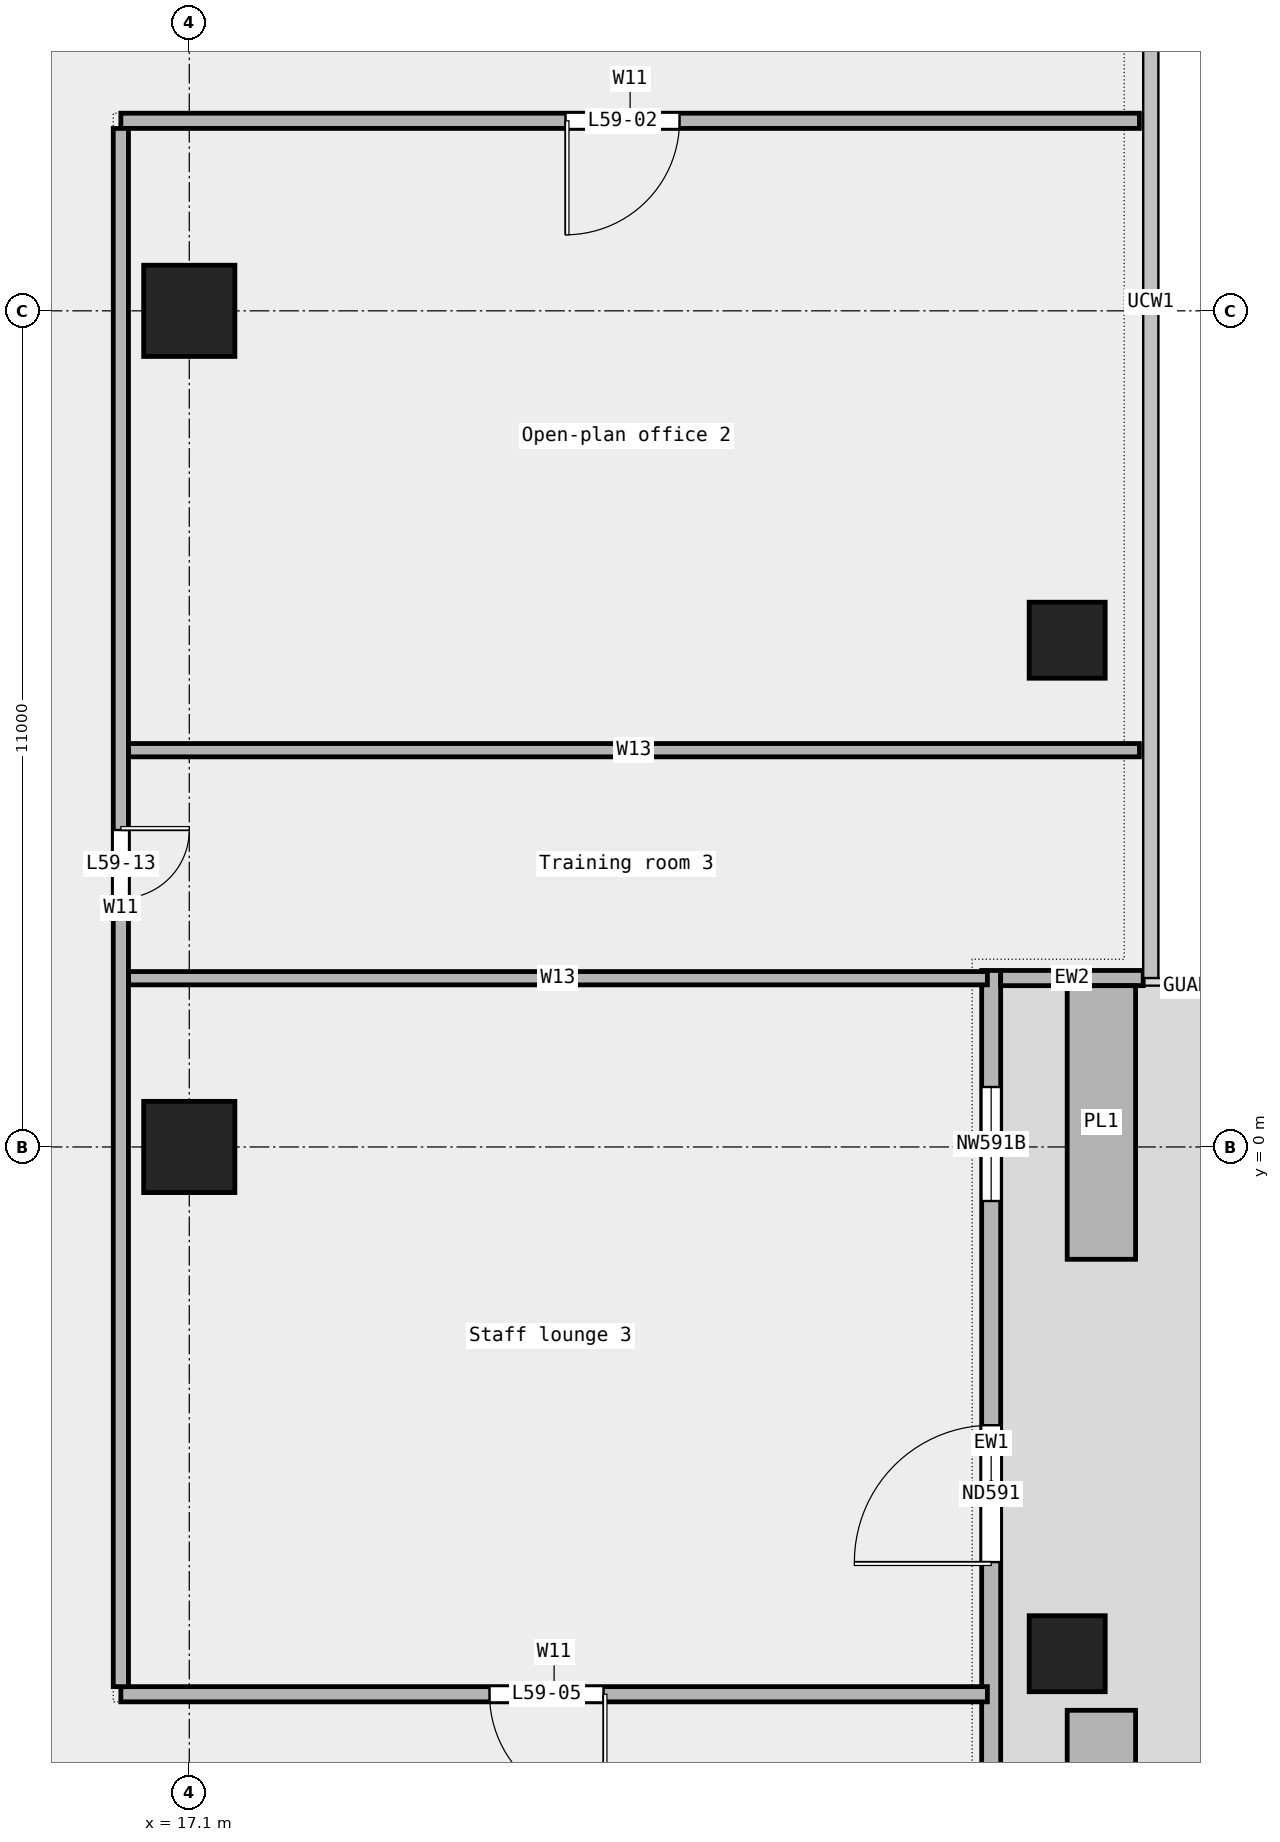
"""IFC4 building model, lengths in metres.
Left out: names, types, materials, properties, quantities, classifications, styles, units other than length and angle.
Written with IfcOpenShell. Run it as: python <this file> out.ifc"""

import sys

from ifc_helpers import new_model, si_unit, direction, frame, frame_2d, origin, origin_2d, place, context, subcontext, project, spatial, rectangle, extrude, element, fill, save


model = new_model("IFC4")
c1 = context("Model", 3, precision=1e-05, world=origin(), true_north=direction((0.0, 1.0)))
c2 = subcontext(c1, "Body", "Model", "MODEL_VIEW")
j1 = project(units=[si_unit("LENGTHUNIT", "METRE"), si_unit("PLANEANGLEUNIT", "RADIAN")], contexts=[c1])
p1 = place(None, origin())
s1 = spatial("IfcSite", under=j1, at=p1, CompositionType="ELEMENT")
p2 = place(p1, origin())
s2 = spatial("IfcBuilding", under=s1, at=p2, CompositionType="ELEMENT")
p3 = place(p2, frame((0.0, 0.0, 275.4)))
s3 = spatial("IfcBuildingStorey", under=s2, at=p3, CompositionType="ELEMENT", Elevation=275.4)
for number, where, z_axis, x_axis in (
    (1, (28.65, -6.667, 0.0), (0.0, 0.0, 1.0), (1.0, 0.0, 0.0)),
    (2, (28.65, 6.667, 0.0), (0.0, 0.0, 1.0), (1.0, 0.0, 0.0)),
):
    element("IfcColumn", number, at=place(p3, frame(where, z_axis=z_axis, x_axis=x_axis)), inside=s3, PredefinedType="COLUMN", context=c2, shape_type="SweptSolid", body=[
        extrude(rectangle(XDim=1.0, YDim=1.0, at=origin_2d()), origin(), (0.0, 0.0, 1.0), 3.6),
    ])
for number, where, z_axis, x_axis in (
    (3, (17.1, 0.0, 0.0), (0.0, 0.0, 1.0), (1.0, 0.0, 0.0)),
    (4, (17.1, 11.0, 0.0), (0.0, 0.0, 1.0), (1.0, 0.0, 0.0)),
):
    element("IfcColumn", number, at=place(p3, frame(where, z_axis=z_axis, x_axis=x_axis)), inside=s3, PredefinedType="COLUMN", context=c2, shape_type="SweptSolid", body=[
        extrude(rectangle(XDim=1.2, YDim=1.2, at=origin_2d()), origin(), (0.0, 0.0, 1.0), 3.6),
    ])
p4 = place(p3, frame((27.65, -11.211, 0.0), z_axis=(0.0, 0.0, 1.0), x_axis=(0.0, 1.0, 0.0)))
e5 = element("IfcWall", 5, at=p4, inside=s3, PredefinedType="STANDARD", context=c2, shape_type="SweptSolid", body=[
    extrude(rectangle(XDim=13.533, YDim=0.25, at=frame_2d((6.767, 0.0))), origin(), (0.0, 0.0, 1.0), 3.6),
])
p5 = place(p4, frame((1.5, 0.0, 0.45)))
e6 = element("IfcOpeningElement", 6, at=p5, cuts=e5, PredefinedType="OPENING", context=c2, shape_type="SweptSolid", body=[
    extrude(rectangle(XDim=1.5, YDim=2.4, at=frame_2d((0.75, 1.2))), frame((0.0, 0.137, 0.0), z_axis=(0.0, -1.0, 0.0), x_axis=(1.0, 0.0, 0.0)), (0.0, 0.0, 1.0), 0.274),
])
p6 = place(p4, frame((5.75, 0.0, 0.0)))
e7 = element("IfcOpeningElement", 7, at=p6, cuts=e5, PredefinedType="OPENING", context=c2, shape_type="SweptSolid", body=[
    extrude(rectangle(XDim=1.8, YDim=2.4, at=frame_2d((0.9, 1.2))), frame((0.0, 0.137, 0.0), z_axis=(0.0, -1.0, 0.0), x_axis=(1.0, 0.0, 0.0)), (0.0, 0.0, 1.0), 0.274),
])
p7 = place(p4, frame((10.5, 0.0, 0.45)))
e8 = element("IfcOpeningElement", 8, at=p7, cuts=e5, PredefinedType="OPENING", context=c2, shape_type="SweptSolid", body=[
    extrude(rectangle(XDim=1.5, YDim=2.4, at=frame_2d((0.75, 1.2))), frame((0.0, 0.137, 0.0), z_axis=(0.0, -1.0, 0.0), x_axis=(1.0, 0.0, 0.0)), (0.0, 0.0, 1.0), 0.274),
])
p8 = place(p3, frame((29.65, 2.222, 0.0), z_axis=(0.0, 0.0, 1.0), x_axis=(-1.0, 0.0, 0.0)))
e9 = element("IfcWall", 9, at=p8, inside=s3, PredefinedType="STANDARD", context=c2, shape_type="SweptSolid", body=[
    extrude(rectangle(XDim=1.875, YDim=0.2, at=frame_2d((0.938, 0.0))), origin(), (0.0, 0.0, 1.0), 3.6),
])
for number, where, z_axis, x_axis in (
    (10, (29.1, -11.011, 0.0), (0.0, 0.0, 1.0), (0.0, 1.0, 0.0)),
    (11, (29.1, -1.478, 0.0), (0.0, 0.0, 1.0), (0.0, 1.0, 0.0)),
):
    element("IfcWall", number, at=place(p3, frame(where, z_axis=z_axis, x_axis=x_axis)), inside=s3, PredefinedType="STANDARD", context=c2, shape_type="SweptSolid", body=[
        extrude(rectangle(XDim=3.6, YDim=0.9, at=frame_2d((1.8, 0.0))), origin(), (0.0, 0.0, 1.0), 0.7),
    ])
p9 = place(p3, frame((16.2, -7.2, 0.0), z_axis=(0.0, 0.0, 1.0), x_axis=(1.0, 0.0, 0.0)))
e12 = element("IfcWall", 12, at=p9, inside=s3, PredefinedType="PARTITIONING", context=c2, shape_type="SweptSolid", body=[
    extrude(rectangle(XDim=11.4, YDim=0.2, at=frame_2d((5.7, 0.0))), origin(), (0.0, 0.0, 1.0), 3.6),
])
p10 = place(p9, frame((4.85, 0.0, 0.0)))
e13 = element("IfcOpeningElement", 13, at=p10, cuts=e12, PredefinedType="OPENING", context=c2, shape_type="SweptSolid", body=[
    extrude(rectangle(XDim=1.5, YDim=2.1, at=frame_2d((0.75, 1.05))), frame((0.0, 0.112, 0.0), z_axis=(0.0, -1.0, 0.0), x_axis=(1.0, 0.0, 0.0)), (0.0, 0.0, 1.0), 0.224),
])
p11 = place(p3, frame((16.3, 2.22, 0.0), z_axis=(0.0, 0.0, 1.0), x_axis=(1.0, 0.0, 0.0)))
e14 = element("IfcWall", 14, at=p11, inside=s3, PredefinedType="PARTITIONING", context=c2, shape_type="SweptSolid", body=[
    extrude(rectangle(XDim=11.3, YDim=0.175, at=frame_2d((5.65, 0.0))), origin(), (0.0, 0.0, 1.0), 3.6),
])
p12 = place(p3, frame((16.3, 5.22, 0.0), z_axis=(0.0, 0.0, 1.0), x_axis=(1.0, 0.0, 0.0)))
e15 = element("IfcWall", 15, at=p12, inside=s3, PredefinedType="PARTITIONING", context=c2, shape_type="SweptSolid", body=[
    extrude(rectangle(XDim=13.3, YDim=0.175, at=frame_2d((6.65, 0.0))), origin(), (0.0, 0.0, 1.0), 3.6),
])
p13 = place(p3, frame((16.2, 13.5, 0.0), z_axis=(0.0, 0.0, 1.0), x_axis=(1.0, 0.0, 0.0)))
e16 = element("IfcWall", 16, at=p13, inside=s3, PredefinedType="PARTITIONING", context=c2, shape_type="SweptSolid", body=[
    extrude(rectangle(XDim=13.4, YDim=0.2, at=frame_2d((6.7, 0.0))), origin(), (0.0, 0.0, 1.0), 3.6),
])
p14 = place(p13, frame((5.85, 0.0, 0.0)))
e17 = element("IfcOpeningElement", 17, at=p14, cuts=e16, PredefinedType="OPENING", context=c2, shape_type="SweptSolid", body=[
    extrude(rectangle(XDim=1.5, YDim=2.1, at=frame_2d((0.75, 1.05))), frame((0.0, 0.112, 0.0), z_axis=(0.0, -1.0, 0.0), x_axis=(1.0, 0.0, 0.0)), (0.0, 0.0, 1.0), 0.224),
])
p15 = place(p3, frame((16.2, -7.1, 0.0), z_axis=(0.0, 0.0, 1.0), x_axis=(0.0, 1.0, 0.0)))
e18 = element("IfcWall", 18, at=p15, inside=s3, PredefinedType="PARTITIONING", context=c2, shape_type="SweptSolid", body=[
    extrude(rectangle(XDim=20.5, YDim=0.2, at=frame_2d((10.25, 0.0))), origin(), (0.0, 0.0, 1.0), 3.6),
])
p16 = place(p15, frame((10.37, 0.0, 0.0)))
e19 = element("IfcOpeningElement", 19, at=p16, cuts=e18, PredefinedType="OPENING", context=c2, shape_type="SweptSolid", body=[
    extrude(rectangle(XDim=0.9, YDim=2.1, at=frame_2d((0.45, 1.05))), frame((0.0, 0.112, 0.0), z_axis=(0.0, -1.0, 0.0), x_axis=(1.0, 0.0, 0.0)), (0.0, 0.0, 1.0), 0.224),
])
p17 = place(p6, origin())
e20 = element("IfcDoor", 20, at=p17, inside=s3, OperationType="DOUBLE_DOOR_SINGLE_SWING", PredefinedType="DOOR", context=c2, shape_type="SweptSolid", body=[
    extrude(rectangle(XDim=1.8, YDim=2.4, at=frame_2d((0.9, 1.2))), frame((0.0, 0.025, 0.0), z_axis=(0.0, -1.0, 0.0), x_axis=(1.0, 0.0, 0.0)), (0.0, 0.0, 1.0), 0.05),
])
fill(e7, e20)
p18 = place(p7, origin())
e21 = element("IfcWindow", 21, at=p18, inside=s3, PartitioningType="SINGLE_PANEL", PredefinedType="WINDOW", context=c2, shape_type="SweptSolid", body=[
    extrude(rectangle(XDim=1.5, YDim=2.4, at=frame_2d((0.75, 1.2))), frame((0.0, 0.03, 0.0), z_axis=(0.0, -1.0, 0.0), x_axis=(1.0, 0.0, 0.0)), (0.0, 0.0, 1.0), 0.06),
])
fill(e8, e21)
p19 = place(p14, origin())
e22 = element("IfcDoor", 22, at=p19, inside=s3, OperationType="DOUBLE_DOOR_SINGLE_SWING", PredefinedType="DOOR", context=c2, shape_type="SweptSolid", body=[
    extrude(rectangle(XDim=1.5, YDim=2.1, at=frame_2d((0.75, 1.05))), frame((0.0, 0.025, 0.0), z_axis=(0.0, -1.0, 0.0), x_axis=(1.0, 0.0, 0.0)), (0.0, 0.0, 1.0), 0.05),
])
fill(e17, e22)
p20 = place(p10, origin())
e23 = element("IfcDoor", 23, at=p20, inside=s3, OperationType="DOUBLE_DOOR_SINGLE_SWING", PredefinedType="DOOR", context=c2, shape_type="SweptSolid", body=[
    extrude(rectangle(XDim=1.5, YDim=2.1, at=frame_2d((0.75, 1.05))), frame((0.0, 0.025, 0.0), z_axis=(0.0, -1.0, 0.0), x_axis=(1.0, 0.0, 0.0)), (0.0, 0.0, 1.0), 0.05),
])
fill(e13, e23)
p21 = place(p16, origin())
e24 = element("IfcDoor", 24, at=p21, inside=s3, OperationType="SINGLE_SWING_LEFT", PredefinedType="DOOR", context=c2, shape_type="SweptSolid", body=[
    extrude(rectangle(XDim=0.9, YDim=2.1, at=frame_2d((0.45, 1.05))), frame((0.0, 0.025, 0.0), z_axis=(0.0, -1.0, 0.0), x_axis=(1.0, 0.0, 0.0)), (0.0, 0.0, 1.0), 0.05),
])
fill(e19, e24)
save(model, sys.argv[1])
